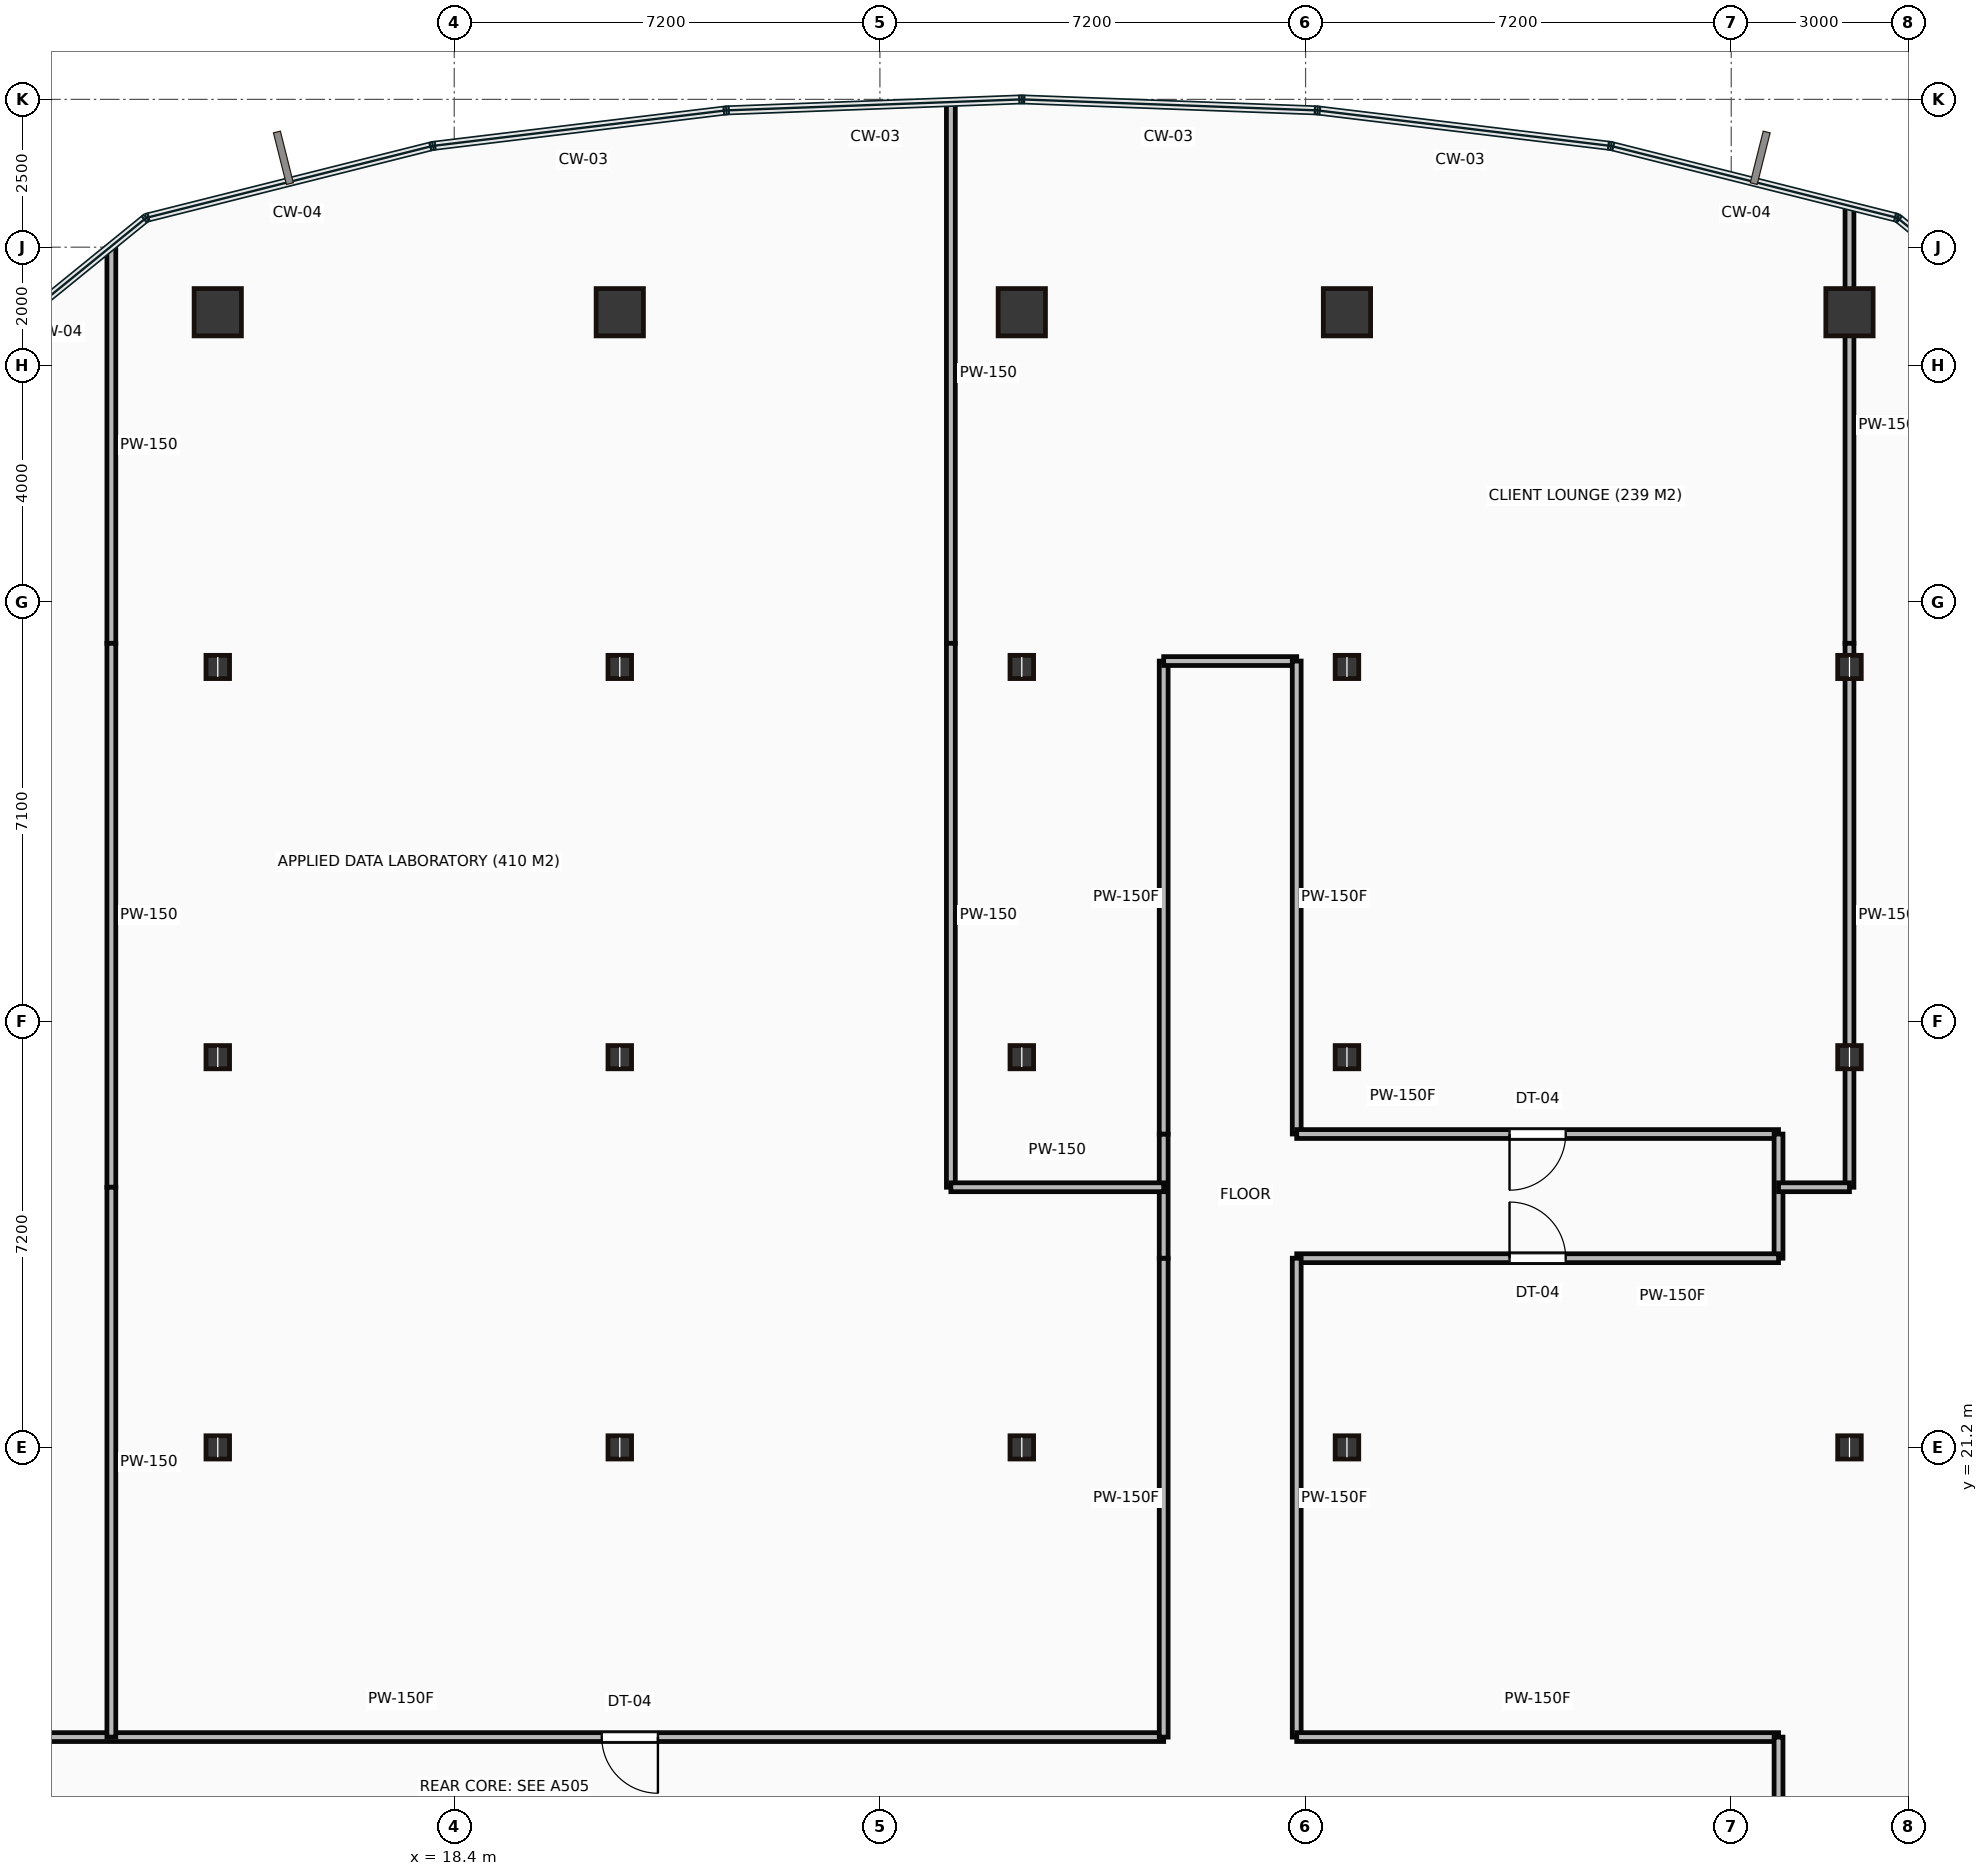
"""IFC4 building model, lengths in metres.
Left out: names, types, materials, properties, quantities, classifications, styles, units other than length and angle.
Written with IfcOpenShell. Run it as: python <this file> out.ifc"""

import sys

from ifc_helpers import new_model, si_unit, direction, frame, frame_2d, origin, origin_2d, place, context, subcontext, project, spatial, rectangle, hollow_rectangle, i_section, extrude, source, transform, mapped, element, fill, save


model = new_model("IFC4")
c1 = context("Model", 3, precision=1e-05, world=origin(), true_north=direction((0.0, 1.0)))
c2 = subcontext(c1, "Body", "Model", "MODEL_VIEW")
j1 = project(units=[si_unit("LENGTHUNIT", "METRE"), si_unit("PLANEANGLEUNIT", "RADIAN")], contexts=[c1])
p1 = place(None, origin())
s1 = spatial("IfcSite", under=j1, at=p1, CompositionType="ELEMENT")
p2 = place(p1, origin())
s2 = spatial("IfcBuilding", under=s1, at=p2, CompositionType="ELEMENT")
p3 = place(p2, frame((0.0, 0.0, 117.85)))
s3 = spatial("IfcBuildingStorey", under=s2, at=p3, CompositionType="ELEMENT", Elevation=117.85)
m1 = source(origin(), c2, "Body", "SweptSolid", [
    extrude(i_section(OverallWidth=0.399, OverallDepth=0.393, WebThickness=0.023, FlangeThickness=0.037, at=origin_2d()), origin(), (0.0, 0.0, 1.0), 3.65),
])
for number, where, z_axis, x_axis in (
    (1, (14.4, 21.2, 0.0), (0.0, 0.0, 1.0), (1.0, 0.0, 0.0)),
    (2, (14.4, 27.8, 0.0), (0.0, 0.0, 1.0), (1.0, 0.0, 0.0)),
    (3, (14.4, 34.4, 0.0), (0.0, 0.0, 1.0), (1.0, 0.0, 0.0)),
):
    element("IfcColumn", number, at=place(p3, frame(where, z_axis=z_axis, x_axis=x_axis)), inside=s3, PredefinedType="COLUMN", context=c2, shape_type="MappedRepresentation", body=[
        mapped(m1, transform((0.0, 0.0, 0.0))),
    ])
m2 = source(origin(), c2, "Body", "SweptSolid", [
    extrude(hollow_rectangle(XDim=0.8, YDim=0.8, WallThickness=0.04, at=origin_2d()), origin(), (0.0, 0.0, 1.0), 3.65),
])
p4 = place(p3, frame((14.4, 40.4, 0.0), z_axis=(0.0, 0.0, 1.0), x_axis=(1.0, 0.0, 0.0)))
e4 = element("IfcColumn", 4, at=p4, inside=s3, PredefinedType="COLUMN", context=c2, shape_type="MappedRepresentation", body=[
    mapped(m2, transform((0.0, 0.0, 0.0))),
])
for number, where, z_axis, x_axis in (
    (5, (21.2, 21.2, 0.0), (0.0, 0.0, 1.0), (1.0, 0.0, 0.0)),
    (6, (21.2, 27.8, 0.0), (0.0, 0.0, 1.0), (1.0, 0.0, 0.0)),
    (7, (21.2, 34.4, 0.0), (0.0, 0.0, 1.0), (1.0, 0.0, 0.0)),
):
    element("IfcColumn", number, at=place(p3, frame(where, z_axis=z_axis, x_axis=x_axis)), inside=s3, PredefinedType="COLUMN", context=c2, shape_type="MappedRepresentation", body=[
        mapped(m1, transform((0.0, 0.0, 0.0))),
    ])
p5 = place(p3, frame((21.2, 40.4, 0.0), z_axis=(0.0, 0.0, 1.0), x_axis=(1.0, 0.0, 0.0)))
e8 = element("IfcColumn", 8, at=p5, inside=s3, PredefinedType="COLUMN", context=c2, shape_type="MappedRepresentation", body=[
    mapped(m2, transform((0.0, 0.0, 0.0))),
])
for number, where, z_axis, x_axis in (
    (9, (28.0, 21.2, 0.0), (0.0, 0.0, 1.0), (1.0, 0.0, 0.0)),
    (10, (28.0, 27.8, 0.0), (0.0, 0.0, 1.0), (1.0, 0.0, 0.0)),
    (11, (28.0, 34.4, 0.0), (0.0, 0.0, 1.0), (1.0, 0.0, 0.0)),
):
    element("IfcColumn", number, at=place(p3, frame(where, z_axis=z_axis, x_axis=x_axis)), inside=s3, PredefinedType="COLUMN", context=c2, shape_type="MappedRepresentation", body=[
        mapped(m1, transform((0.0, 0.0, 0.0))),
    ])
p6 = place(p3, frame((28.0, 40.4, 0.0), z_axis=(0.0, 0.0, 1.0), x_axis=(1.0, 0.0, 0.0)))
e12 = element("IfcColumn", 12, at=p6, inside=s3, PredefinedType="COLUMN", context=c2, shape_type="MappedRepresentation", body=[
    mapped(m2, transform((0.0, 0.0, 0.0))),
])
for number, where, z_axis, x_axis in (
    (13, (33.5, 21.2, 0.0), (0.0, 0.0, 1.0), (1.0, 0.0, 0.0)),
    (14, (33.5, 27.8, 0.0), (0.0, 0.0, 1.0), (1.0, 0.0, 0.0)),
    (15, (33.5, 34.4, 0.0), (0.0, 0.0, 1.0), (1.0, 0.0, 0.0)),
):
    element("IfcColumn", number, at=place(p3, frame(where, z_axis=z_axis, x_axis=x_axis)), inside=s3, PredefinedType="COLUMN", context=c2, shape_type="MappedRepresentation", body=[
        mapped(m1, transform((0.0, 0.0, 0.0))),
    ])
p7 = place(p3, frame((33.5, 40.4, 0.0), z_axis=(0.0, 0.0, 1.0), x_axis=(1.0, 0.0, 0.0)))
e16 = element("IfcColumn", 16, at=p7, inside=s3, PredefinedType="COLUMN", context=c2, shape_type="MappedRepresentation", body=[
    mapped(m2, transform((0.0, 0.0, 0.0))),
])
for number, where, z_axis, x_axis in (
    (17, (42.0, 21.2, 0.0), (0.0, 0.0, 1.0), (1.0, 0.0, 0.0)),
    (18, (42.0, 27.8, 0.0), (0.0, 0.0, 1.0), (1.0, 0.0, 0.0)),
    (19, (42.0, 34.4, 0.0), (0.0, 0.0, 1.0), (1.0, 0.0, 0.0)),
):
    element("IfcColumn", number, at=place(p3, frame(where, z_axis=z_axis, x_axis=x_axis)), inside=s3, PredefinedType="COLUMN", context=c2, shape_type="MappedRepresentation", body=[
        mapped(m1, transform((0.0, 0.0, 0.0))),
    ])
p8 = place(p3, frame((42.0, 40.4, 0.0), z_axis=(0.0, 0.0, 1.0), x_axis=(1.0, 0.0, 0.0)))
e20 = element("IfcColumn", 20, at=p8, inside=s3, PredefinedType="COLUMN", context=c2, shape_type="MappedRepresentation", body=[
    mapped(m2, transform((0.0, 0.0, 0.0))),
])
m3 = source(origin(), c2, "Body", "SweptSolid", [
    extrude(rectangle(XDim=25.8, YDim=0.15, at=frame_2d((12.9, 0.0))), origin(), (0.0, 0.0, 1.0), 3.4),
])
p9 = place(p3, frame((4.6, 16.3, 0.0), z_axis=(0.0, 0.0, 1.0), x_axis=(1.0, 0.0, 0.0)))
e21 = element("IfcWall", 21, at=p9, inside=s3, PredefinedType="PARTITIONING", context=c2, shape_type="MappedRepresentation", body=[
    mapped(m3, transform((0.0, 0.0, 0.0))),
])
p10 = place(p9, frame((3.655, 0.0, 0.0)))
e22 = element("IfcOpeningElement", 22, at=p10, cuts=e21, PredefinedType="OPENING", context=c2, shape_type="SweptSolid", body=[
    extrude(rectangle(XDim=0.95, YDim=2.15, at=frame_2d((0.475, 1.075))), frame((0.0, 0.085, 0.0), z_axis=(0.0, -1.0, 0.0), x_axis=(1.0, 0.0, 0.0)), (0.0, 0.0, 1.0), 0.17),
])
p11 = place(p9, frame((16.295, 0.0, 0.0)))
e23 = element("IfcOpeningElement", 23, at=p11, cuts=e21, PredefinedType="OPENING", context=c2, shape_type="SweptSolid", body=[
    extrude(rectangle(XDim=0.95, YDim=2.15, at=frame_2d((0.475, 1.075))), frame((0.0, 0.085, 0.0), z_axis=(0.0, -1.0, 0.0), x_axis=(1.0, 0.0, 0.0)), (0.0, 0.0, 1.0), 0.17),
])
m4 = source(origin(), c2, "Body", "SweptSolid", [
    extrude(rectangle(XDim=8.1, YDim=0.15, at=frame_2d((4.05, 0.0))), origin(), (0.0, 0.0, 1.0), 3.4),
])
p12 = place(p3, frame((30.4, 16.3, 0.0), z_axis=(0.0, 0.0, 1.0), x_axis=(0.0, 1.0, 0.0)))
e24 = element("IfcWall", 24, at=p12, inside=s3, PredefinedType="PARTITIONING", context=c2, shape_type="MappedRepresentation", body=[
    mapped(m4, transform((0.0, 0.0, 0.0))),
])
m5 = source(origin(), c2, "Body", "SweptSolid", [
    extrude(rectangle(XDim=2.1, YDim=0.15, at=frame_2d((1.05, 0.0))), origin(), (0.0, 0.0, 1.0), 3.4),
])
p13 = place(p3, frame((30.4, 24.4, 0.0), z_axis=(0.0, 0.0, 1.0), x_axis=(0.0, 1.0, 0.0)))
e25 = element("IfcWall", 25, at=p13, inside=s3, PredefinedType="PARTITIONING", context=c2, shape_type="MappedRepresentation", body=[
    mapped(m5, transform((0.0, 0.0, 0.0))),
])
m6 = source(origin(), c2, "Body", "SweptSolid", [
    extrude(rectangle(XDim=8.0, YDim=0.15, at=frame_2d((4.0, 0.0))), origin(), (0.0, 0.0, 1.0), 3.4),
])
p14 = place(p3, frame((30.4, 26.5, 0.0), z_axis=(0.0, 0.0, 1.0), x_axis=(0.0, 1.0, 0.0)))
e26 = element("IfcWall", 26, at=p14, inside=s3, PredefinedType="PARTITIONING", context=c2, shape_type="MappedRepresentation", body=[
    mapped(m6, transform((0.0, 0.0, 0.0))),
])
m7 = source(origin(), c2, "Body", "SweptSolid", [
    extrude(rectangle(XDim=2.25, YDim=0.15, at=frame_2d((1.125, 0.0))), origin(), (0.0, 0.0, 1.0), 2.702),
])
p15 = place(p3, frame((30.4, 34.5, 0.0), z_axis=(0.0, 0.0, 1.0), x_axis=(1.0, 0.0, 0.0)))
e27 = element("IfcWall", 27, at=p15, inside=s3, PredefinedType="PARTITIONING", context=c2, shape_type="MappedRepresentation", body=[
    mapped(m7, transform((0.0, 0.0, 0.0))),
])
p16 = place(p3, frame((32.65, 34.5, 0.0), z_axis=(0.0, 0.0, 1.0), x_axis=(0.0, -1.0, 0.0)))
e28 = element("IfcWall", 28, at=p16, inside=s3, PredefinedType="PARTITIONING", context=c2, shape_type="MappedRepresentation", body=[
    mapped(m6, transform((0.0, 0.0, 0.0))),
])
m8 = source(origin(), c2, "Body", "SweptSolid", [
    extrude(rectangle(XDim=8.15, YDim=0.15, at=frame_2d((4.075, 0.0))), origin(), (0.0, 0.0, 1.0), 3.4),
])
p17 = place(p3, frame((32.65, 26.5, 0.0), z_axis=(0.0, 0.0, 1.0), x_axis=(1.0, 0.0, 0.0)))
e29 = element("IfcWall", 29, at=p17, inside=s3, PredefinedType="PARTITIONING", context=c2, shape_type="MappedRepresentation", body=[
    mapped(m8, transform((0.0, 0.0, 0.0))),
])
p18 = place(p17, frame((3.6, 0.0, 0.0)))
e30 = element("IfcOpeningElement", 30, at=p18, cuts=e29, PredefinedType="OPENING", context=c2, shape_type="SweptSolid", body=[
    extrude(rectangle(XDim=0.95, YDim=2.15, at=frame_2d((0.475, 1.075))), frame((0.0, 0.085, 0.0), z_axis=(0.0, -1.0, 0.0), x_axis=(1.0, 0.0, 0.0)), (0.0, 0.0, 1.0), 0.17),
])
p19 = place(p3, frame((40.8, 26.5, 0.0), z_axis=(0.0, 0.0, 1.0), x_axis=(0.0, -1.0, 0.0)))
e31 = element("IfcWall", 31, at=p19, inside=s3, PredefinedType="PARTITIONING", context=c2, shape_type="MappedRepresentation", body=[
    mapped(m5, transform((0.0, 0.0, 0.0))),
])
p20 = place(p3, frame((40.8, 24.4, 0.0), z_axis=(0.0, 0.0, 1.0), x_axis=(-1.0, 0.0, 0.0)))
e32 = element("IfcWall", 32, at=p20, inside=s3, PredefinedType="PARTITIONING", context=c2, shape_type="MappedRepresentation", body=[
    mapped(m8, transform((0.0, 0.0, 0.0))),
])
p21 = place(p20, frame((3.6, 0.0, 0.0)))
e33 = element("IfcOpeningElement", 33, at=p21, cuts=e32, PredefinedType="OPENING", context=c2, shape_type="SweptSolid", body=[
    extrude(rectangle(XDim=0.95, YDim=2.15, at=frame_2d((0.475, 1.075))), frame((0.0, 0.085, 0.0), z_axis=(0.0, -1.0, 0.0), x_axis=(1.0, 0.0, 0.0)), (0.0, 0.0, 1.0), 0.17),
])
p22 = place(p3, frame((32.65, 24.4, 0.0), z_axis=(0.0, 0.0, 1.0), x_axis=(0.0, -1.0, 0.0)))
e34 = element("IfcWall", 34, at=p22, inside=s3, PredefinedType="PARTITIONING", context=c2, shape_type="MappedRepresentation", body=[
    mapped(m4, transform((0.0, 0.0, 0.0))),
])
p23 = place(p3, frame((32.65, 16.3, 0.0), z_axis=(0.0, 0.0, 1.0), x_axis=(1.0, 0.0, 0.0)))
e35 = element("IfcWall", 35, at=p23, inside=s3, PredefinedType="PARTITIONING", context=c2, shape_type="MappedRepresentation", body=[
    mapped(m8, transform((0.0, 0.0, 0.0))),
])
m9 = source(origin(), c2, "Body", "SweptSolid", [
    extrude(rectangle(XDim=2.3, YDim=0.15, at=frame_2d((1.15, 0.0))), origin(), (0.0, 0.0, 1.0), 3.4),
])
p24 = place(p3, frame((40.8, 16.3, 0.0), z_axis=(0.0, 0.0, 1.0), x_axis=(0.0, -1.0, 0.0)))
e36 = element("IfcWall", 36, at=p24, inside=s3, PredefinedType="PARTITIONING", context=c2, shape_type="MappedRepresentation", body=[
    mapped(m9, transform((0.0, 0.0, 0.0))),
])
m10 = source(origin(), c2, "Body", "SweptSolid", [
    extrude(rectangle(XDim=6.692, YDim=0.15, at=frame_2d((3.346, 0.0))), origin(), (0.0, 0.0, 1.0), 3.4),
])
p25 = place(p3, frame((12.6, 41.492, 0.0), z_axis=(0.0, 0.0, 1.0), x_axis=(0.0, -1.0, 0.0)))
e37 = element("IfcWall", 37, at=p25, inside=s3, PredefinedType="PARTITIONING", context=c2, shape_type="MappedRepresentation", body=[
    mapped(m10, transform((0.0, 0.0, 0.0))),
])
m11 = source(origin(), c2, "Body", "SweptSolid", [
    extrude(rectangle(XDim=9.2, YDim=0.15, at=frame_2d((4.6, 0.0))), origin(), (0.0, 0.0, 1.0), 3.4),
])
p26 = place(p3, frame((12.6, 34.8, 0.0), z_axis=(0.0, 0.0, 1.0), x_axis=(0.0, -1.0, 0.0)))
e38 = element("IfcWall", 38, at=p26, inside=s3, PredefinedType="PARTITIONING", context=c2, shape_type="MappedRepresentation", body=[
    mapped(m11, transform((0.0, 0.0, 0.0))),
])
m12 = source(origin(), c2, "Body", "SweptSolid", [
    extrude(rectangle(XDim=9.3, YDim=0.15, at=frame_2d((4.65, 0.0))), origin(), (0.0, 0.0, 1.0), 3.4),
])
p27 = place(p3, frame((12.6, 25.6, 0.0), z_axis=(0.0, 0.0, 1.0), x_axis=(0.0, -1.0, 0.0)))
e39 = element("IfcWall", 39, at=p27, inside=s3, PredefinedType="PARTITIONING", context=c2, shape_type="MappedRepresentation", body=[
    mapped(m12, transform((0.0, 0.0, 0.0))),
])
m13 = source(origin(), c2, "Body", "SweptSolid", [
    extrude(rectangle(XDim=9.135, YDim=0.15, at=frame_2d((4.568, 0.0))), origin(), (0.0, 0.0, 1.0), 3.4),
])
p28 = place(p3, frame((26.8, 43.935, 0.0), z_axis=(0.0, 0.0, 1.0), x_axis=(0.0, -1.0, 0.0)))
e40 = element("IfcWall", 40, at=p28, inside=s3, PredefinedType="PARTITIONING", context=c2, shape_type="MappedRepresentation", body=[
    mapped(m13, transform((0.0, 0.0, 0.0))),
])
p29 = place(p3, frame((26.8, 34.8, 0.0), z_axis=(0.0, 0.0, 1.0), x_axis=(0.0, -1.0, 0.0)))
e41 = element("IfcWall", 41, at=p29, inside=s3, PredefinedType="PARTITIONING", context=c2, shape_type="MappedRepresentation", body=[
    mapped(m11, transform((0.0, 0.0, 0.0))),
])
m14 = source(origin(), c2, "Body", "SweptSolid", [
    extrude(rectangle(XDim=3.6, YDim=0.15, at=frame_2d((1.8, 0.0))), origin(), (0.0, 0.0, 1.0), 2.988),
])
p30 = place(p3, frame((26.8, 25.6, 0.0), z_axis=(0.0, 0.0, 1.0), x_axis=(1.0, 0.0, 0.0)))
e42 = element("IfcWall", 42, at=p30, inside=s3, PredefinedType="PARTITIONING", context=c2, shape_type="MappedRepresentation", body=[
    mapped(m14, transform((0.0, 0.0, 0.0))),
])
m15 = source(origin(), c2, "Body", "SweptSolid", [
    extrude(rectangle(XDim=7.379, YDim=0.15, at=frame_2d((3.689, 0.0))), origin(), (0.0, 0.0, 1.0), 2.702),
])
p31 = place(p3, frame((42.0, 42.179, 0.0), z_axis=(0.0, 0.0, 1.0), x_axis=(0.0, -1.0, 0.0)))
e43 = element("IfcWall", 43, at=p31, inside=s3, PredefinedType="PARTITIONING", context=c2, shape_type="MappedRepresentation", body=[
    mapped(m15, transform((0.0, 0.0, 0.0))),
])
m16 = source(origin(), c2, "Body", "SweptSolid", [
    extrude(rectangle(XDim=9.2, YDim=0.15, at=frame_2d((4.6, 0.0))), origin(), (0.0, 0.0, 1.0), 2.702),
])
p32 = place(p3, frame((42.0, 34.8, 0.0), z_axis=(0.0, 0.0, 1.0), x_axis=(0.0, -1.0, 0.0)))
e44 = element("IfcWall", 44, at=p32, inside=s3, PredefinedType="PARTITIONING", context=c2, shape_type="MappedRepresentation", body=[
    mapped(m16, transform((0.0, 0.0, 0.0))),
])
m17 = source(origin(), c2, "Body", "SweptSolid", [
    extrude(rectangle(XDim=1.2, YDim=0.15, at=frame_2d((0.6, 0.0))), origin(), (0.0, 0.0, 1.0), 2.988),
])
p33 = place(p3, frame((42.0, 25.6, 0.0), z_axis=(0.0, 0.0, 1.0), x_axis=(-1.0, 0.0, 0.0)))
e45 = element("IfcWall", 45, at=p33, inside=s3, PredefinedType="PARTITIONING", context=c2, shape_type="MappedRepresentation", body=[
    mapped(m17, transform((0.0, 0.0, 0.0))),
])
m18 = source(origin(), c2, "Body", "SweptSolid", [
    extrude(rectangle(XDim=0.95, YDim=2.15, at=frame_2d((0.475, 1.075))), frame((0.0, 0.025, 0.0), z_axis=(0.0, -1.0, 0.0), x_axis=(1.0, 0.0, 0.0)), (0.0, 0.0, 1.0), 0.05),
])
p34 = place(p11, origin())
e46 = element("IfcDoor", 46, at=p34, inside=s3, OperationType="SINGLE_SWING_RIGHT", PredefinedType="DOOR", context=c2, shape_type="MappedRepresentation", body=[
    mapped(m18, transform((0.0, 0.0, 0.0))),
])
fill(e23, e46)
p35 = place(p18, origin())
e47 = element("IfcDoor", 47, at=p35, inside=s3, OperationType="SINGLE_SWING_LEFT", PredefinedType="DOOR", context=c2, shape_type="MappedRepresentation", body=[
    mapped(m18, transform((0.0, 0.0, 0.0))),
])
fill(e30, e47)
p36 = place(p21, origin())
e48 = element("IfcDoor", 48, at=p36, inside=s3, OperationType="SINGLE_SWING_RIGHT", PredefinedType="DOOR", context=c2, shape_type="MappedRepresentation", body=[
    mapped(m18, transform((0.0, 0.0, 0.0))),
])
fill(e33, e48)
save(model, sys.argv[1])
